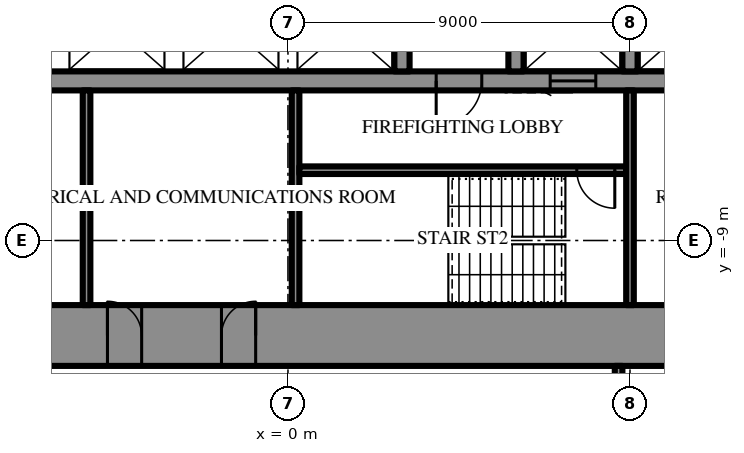
"""IFC4 building model, lengths in metres.
Left out: names, types, materials, properties, quantities, classifications, styles, units other than length and angle.
Written with IfcOpenShell. Run it as: python <this file> out.ifc"""

import sys

from ifc_helpers import new_model, si_unit, direction, frame, frame_2d, origin, place, context, subcontext, project, spatial, rectangle, extrude, element, fill, save


model = new_model("IFC4")
c1 = context("Model", 3, precision=1e-05, world=origin(), true_north=direction((0.0, 1.0)))
c2 = subcontext(c1, "Body", "Model", "MODEL_VIEW")
j1 = project(units=[si_unit("LENGTHUNIT", "METRE"), si_unit("PLANEANGLEUNIT", "RADIAN")], contexts=[c1])
p1 = place(None, origin())
s1 = spatial("IfcSite", under=j1, at=p1, CompositionType="ELEMENT")
p2 = place(p1, origin())
s2 = spatial("IfcBuilding", under=s1, at=p2, CompositionType="ELEMENT")
p3 = place(p2, frame((0.0, 0.0, 136.3)))
s3 = spatial("IfcBuildingStorey", under=s2, at=p3, CompositionType="ELEMENT", Elevation=136.3)
p4 = place(p3, frame((18.6, -11.5, 0.0), z_axis=(0.0, 0.0, 1.0), x_axis=(-1.0, 0.0, 0.0)))
e1 = element("IfcWall", 1, at=p4, inside=s3, PredefinedType="SHEAR", context=c2, shape_type="SweptSolid", body=[
    extrude(rectangle(XDim=37.2, YDim=1.6, at=frame_2d((18.6, 0.0))), origin(), (0.0, 0.0, 1.0), 4.2),
])
p5 = place(p4, frame((19.45, 0.0, 0.0)))
e2 = element("IfcOpeningElement", 2, at=p5, cuts=e1, PredefinedType="OPENING", context=c2, shape_type="SweptSolid", body=[
    extrude(rectangle(XDim=0.9, YDim=2.2, at=frame_2d((0.45, 1.1))), frame((0.0, 0.81, 0.0), z_axis=(0.0, -1.0, 0.0), x_axis=(1.0, 0.0, 0.0)), (0.0, 0.0, 1.0), 1.62),
])
p6 = place(p4, frame((22.45, 0.0, 0.0)))
e3 = element("IfcOpeningElement", 3, at=p6, cuts=e1, PredefinedType="OPENING", context=c2, shape_type="SweptSolid", body=[
    extrude(rectangle(XDim=0.9, YDim=2.2, at=frame_2d((0.45, 1.1))), frame((0.0, 0.81, 0.0), z_axis=(0.0, -1.0, 0.0), x_axis=(1.0, 0.0, 0.0)), (0.0, 0.0, 1.0), 1.62),
])
p7 = place(p4, frame((25.5, 0.0, 0.0)))
e4 = element("IfcOpeningElement", 4, at=p7, cuts=e1, PredefinedType="OPENING", context=c2, shape_type="SweptSolid", body=[
    extrude(rectangle(XDim=1.0, YDim=2.2, at=frame_2d((0.5, 1.1))), frame((0.0, 0.81, 0.0), z_axis=(0.0, -1.0, 0.0), x_axis=(1.0, 0.0, 0.0)), (0.0, 0.0, 1.0), 1.62),
])
p8 = place(p4, frame((1.8, 0.0, 0.0)))
e5 = element("IfcOpeningElement", 5, at=p8, cuts=e1, PredefinedType="OPENING", context=c2, shape_type="SweptSolid", body=[
    extrude(rectangle(XDim=0.9, YDim=2.2, at=frame_2d((0.45, 1.1))), frame((0.0, 0.81, 0.0), z_axis=(0.0, -1.0, 0.0), x_axis=(1.0, 0.0, 0.0)), (0.0, 0.0, 1.0), 1.62),
])
p9 = place(p4, frame((4.65, 0.0, 0.0)))
e6 = element("IfcOpeningElement", 6, at=p9, cuts=e1, PredefinedType="OPENING", context=c2, shape_type="SweptSolid", body=[
    extrude(rectangle(XDim=0.9, YDim=2.2, at=frame_2d((0.45, 1.1))), frame((0.0, 0.81, 0.0), z_axis=(0.0, -1.0, 0.0), x_axis=(1.0, 0.0, 0.0)), (0.0, 0.0, 1.0), 1.62),
])
p10 = place(p4, frame((7.75, 0.0, 0.0)))
e7 = element("IfcOpeningElement", 7, at=p10, cuts=e1, PredefinedType="OPENING", context=c2, shape_type="SweptSolid", body=[
    extrude(rectangle(XDim=0.9, YDim=2.2, at=frame_2d((0.45, 1.1))), frame((0.0, 0.81, 0.0), z_axis=(0.0, -1.0, 0.0), x_axis=(1.0, 0.0, 0.0)), (0.0, 0.0, 1.0), 1.62),
])
p11 = place(p4, frame((28.55, 0.0, 0.0)))
e8 = element("IfcOpeningElement", 8, at=p11, cuts=e1, PredefinedType="OPENING", context=c2, shape_type="SweptSolid", body=[
    extrude(rectangle(XDim=0.9, YDim=2.2, at=frame_2d((0.45, 1.1))), frame((0.0, 0.81, 0.0), z_axis=(0.0, -1.0, 0.0), x_axis=(1.0, 0.0, 0.0)), (0.0, 0.0, 1.0), 1.62),
])
p12 = place(p4, frame((31.65, 0.0, 0.0)))
e9 = element("IfcOpeningElement", 9, at=p12, cuts=e1, PredefinedType="OPENING", context=c2, shape_type="SweptSolid", body=[
    extrude(rectangle(XDim=0.9, YDim=2.2, at=frame_2d((0.45, 1.1))), frame((0.0, 0.81, 0.0), z_axis=(0.0, -1.0, 0.0), x_axis=(1.0, 0.0, 0.0)), (0.0, 0.0, 1.0), 1.62),
])
p13 = place(p4, frame((34.5, 0.0, 0.0)))
e10 = element("IfcOpeningElement", 10, at=p13, cuts=e1, PredefinedType="OPENING", context=c2, shape_type="SweptSolid", body=[
    extrude(rectangle(XDim=0.9, YDim=2.2, at=frame_2d((0.45, 1.1))), frame((0.0, 0.81, 0.0), z_axis=(0.0, -1.0, 0.0), x_axis=(1.0, 0.0, 0.0)), (0.0, 0.0, 1.0), 1.62),
])
p14 = place(p3, frame((11.7, -4.8, 0.0), z_axis=(0.0, 0.0, 1.0), x_axis=(-1.0, 0.0, 0.0)))
e11 = element("IfcWall", 11, at=p14, inside=s3, PredefinedType="SHEAR", context=c2, shape_type="SweptSolid", body=[
    extrude(rectangle(XDim=23.4, YDim=0.5, at=frame_2d((11.7, 0.0))), origin(), (0.0, 0.0, 1.0), 4.2),
])
p15 = place(p14, frame((6.6, 0.0, 0.0)))
e12 = element("IfcOpeningElement", 12, at=p15, cuts=e11, PredefinedType="OPENING", context=c2, shape_type="SweptSolid", body=[
    extrude(rectangle(XDim=1.2, YDim=2.2, at=frame_2d((0.6, 1.1))), frame((0.0, 0.26, 0.0), z_axis=(0.0, -1.0, 0.0), x_axis=(1.0, 0.0, 0.0)), (0.0, 0.0, 1.0), 0.52),
])
p16 = place(p14, frame((3.6, 0.0, 0.0)))
e13 = element("IfcOpeningElement", 13, at=p16, cuts=e11, PredefinedType="OPENING", context=c2, shape_type="SweptSolid", body=[
    extrude(rectangle(XDim=1.2, YDim=2.2, at=frame_2d((0.6, 1.1))), frame((0.0, 0.26, 0.0), z_axis=(0.0, -1.0, 0.0), x_axis=(1.0, 0.0, 0.0)), (0.0, 0.0, 1.0), 0.52),
])
for number, where, z_axis, x_axis in (
    (14, (9.0, -2.25, 0.0), (0.0, 0.0, 1.0), (0.0, -1.0, 0.0)),
    (15, (6.0, -2.25, 0.0), (0.0, 0.0, 1.0), (0.0, -1.0, 0.0)),
    (16, (3.0, -2.25, 0.0), (0.0, 0.0, 1.0), (0.0, -1.0, 0.0)),
):
    element("IfcWall", number, at=place(p3, frame(where, z_axis=z_axis, x_axis=x_axis)), inside=s3, PredefinedType="SHEAR", context=c2, shape_type="SweptSolid", body=[
        extrude(rectangle(XDim=2.3, YDim=0.4, at=frame_2d((1.15, 0.0))), origin(), (0.0, 0.0, 1.0), 4.2),
    ])
p17 = place(p3, frame((0.2, -5.05, 0.0), z_axis=(0.0, 0.0, 1.0), x_axis=(0.0, -1.0, 0.0)))
e17 = element("IfcWall", 17, at=p17, inside=s3, PredefinedType="SHEAR", context=c2, shape_type="SweptSolid", body=[
    extrude(rectangle(XDim=5.65, YDim=0.2, at=frame_2d((2.825, 0.0))), origin(), (0.0, 0.0, 1.0), 4.2),
])
p18 = place(p3, frame((8.9, -7.15, 0.0), z_axis=(0.0, 0.0, 1.0), x_axis=(-1.0, 0.0, 0.0)))
e18 = element("IfcWall", 18, at=p18, inside=s3, PredefinedType="SHEAR", context=c2, shape_type="SweptSolid", body=[
    extrude(rectangle(XDim=8.6, YDim=0.2, at=frame_2d((4.3, 0.0))), origin(), (0.0, 0.0, 1.0), 4.2),
])
p19 = place(p18, frame((0.3, 0.0, 0.0)))
e19 = element("IfcOpeningElement", 19, at=p19, cuts=e18, PredefinedType="OPENING", context=c2, shape_type="SweptSolid", body=[
    extrude(rectangle(XDim=1.0, YDim=2.2, at=frame_2d((0.5, 1.1))), frame((0.0, 0.11, 0.0), z_axis=(0.0, -1.0, 0.0), x_axis=(1.0, 0.0, 0.0)), (0.0, 0.0, 1.0), 0.22),
])
for number, where, z_axis, x_axis in (
    (20, (9.0, -5.05, 0.0), (0.0, 0.0, 1.0), (0.0, -1.0, 0.0)),
    (21, (-5.3, -5.05, 0.0), (0.0, 0.0, 1.0), (0.0, -1.0, 0.0)),
):
    element("IfcWall", number, at=place(p3, frame(where, z_axis=z_axis, x_axis=x_axis)), inside=s3, PredefinedType="PARTITIONING", context=c2, shape_type="SweptSolid", body=[
        extrude(rectangle(XDim=5.65, YDim=0.2, at=frame_2d((2.825, 0.0))), origin(), (0.0, 0.0, 1.0), 4.0),
    ])
p20 = place(p3, frame((8.7, -12.3, 0.0), z_axis=(0.0, 0.0, 1.0), x_axis=(0.0, -1.0, 0.0)))
e22 = element("IfcWall", 22, at=p20, inside=s3, PredefinedType="PARTITIONING", context=c2, shape_type="SweptSolid", body=[
    extrude(rectangle(XDim=19.0, YDim=0.2, at=frame_2d((9.5, 0.0))), origin(), (0.0, 0.0, 1.0), 4.0),
])
p21 = place(p20, frame((1.4, 0.0, 0.0)))
e23 = element("IfcOpeningElement", 23, at=p21, cuts=e22, PredefinedType="OPENING", context=c2, shape_type="SweptSolid", body=[
    extrude(rectangle(XDim=1.0, YDim=2.2, at=frame_2d((0.5, 1.1))), frame((0.0, 0.11, 0.0), z_axis=(0.0, -1.0, 0.0), x_axis=(1.0, 0.0, 0.0)), (0.0, 0.0, 1.0), 0.22),
])
p22 = place(p15, origin())
e24 = element("IfcDoor", 24, at=p22, inside=s3, OperationType="SINGLE_SWING_LEFT", PredefinedType="DOOR", context=c2, shape_type="SweptSolid", body=[
    extrude(rectangle(XDim=1.2, YDim=2.2, at=frame_2d((0.6, 1.1))), frame((0.0, 0.025, 0.0), z_axis=(0.0, -1.0, 0.0), x_axis=(1.0, 0.0, 0.0)), (0.0, 0.0, 1.0), 0.05),
])
fill(e12, e24)
p23 = place(p19, origin())
e25 = element("IfcDoor", 25, at=p23, inside=s3, OperationType="SINGLE_SWING_RIGHT", PredefinedType="DOOR", context=c2, shape_type="SweptSolid", body=[
    extrude(rectangle(XDim=1.0, YDim=2.2, at=frame_2d((0.5, 1.1))), frame((0.0, 0.025, 0.0), z_axis=(0.0, -1.0, 0.0), x_axis=(1.0, 0.0, 0.0)), (0.0, 0.0, 1.0), 0.05),
])
fill(e19, e25)
p24 = place(p5, frame((0.9, 0.0, 0.0), z_axis=(0.0, 0.0, 1.0), x_axis=(-1.0, 0.0, 0.0)))
e26 = element("IfcDoor", 26, at=p24, inside=s3, OperationType="SINGLE_SWING_LEFT", PredefinedType="DOOR", context=c2, shape_type="SweptSolid", body=[
    extrude(rectangle(XDim=0.9, YDim=2.2, at=frame_2d((0.45, 1.1))), frame((0.0, 0.025, 0.0), z_axis=(0.0, -1.0, 0.0), x_axis=(1.0, 0.0, 0.0)), (0.0, 0.0, 1.0), 0.05),
])
fill(e2, e26)
p25 = place(p6, frame((0.9, 0.0, 0.0), z_axis=(0.0, 0.0, 1.0), x_axis=(-1.0, 0.0, 0.0)))
e27 = element("IfcDoor", 27, at=p25, inside=s3, OperationType="SINGLE_SWING_RIGHT", PredefinedType="DOOR", context=c2, shape_type="SweptSolid", body=[
    extrude(rectangle(XDim=0.9, YDim=2.2, at=frame_2d((0.45, 1.1))), frame((0.0, 0.025, 0.0), z_axis=(0.0, -1.0, 0.0), x_axis=(1.0, 0.0, 0.0)), (0.0, 0.0, 1.0), 0.05),
])
fill(e3, e27)
p26 = place(p16, origin())
e28 = element("IfcDoor", 28, at=p26, inside=s3, OperationType="SLIDING_TO_LEFT", PredefinedType="DOOR", context=c2, shape_type="SweptSolid", body=[
    extrude(rectangle(XDim=1.2, YDim=2.2, at=frame_2d((0.6, 1.1))), frame((0.0, 0.025, 0.0), z_axis=(0.0, -1.0, 0.0), x_axis=(1.0, 0.0, 0.0)), (0.0, 0.0, 1.0), 0.05),
])
fill(e13, e28)
save(model, sys.argv[1])
